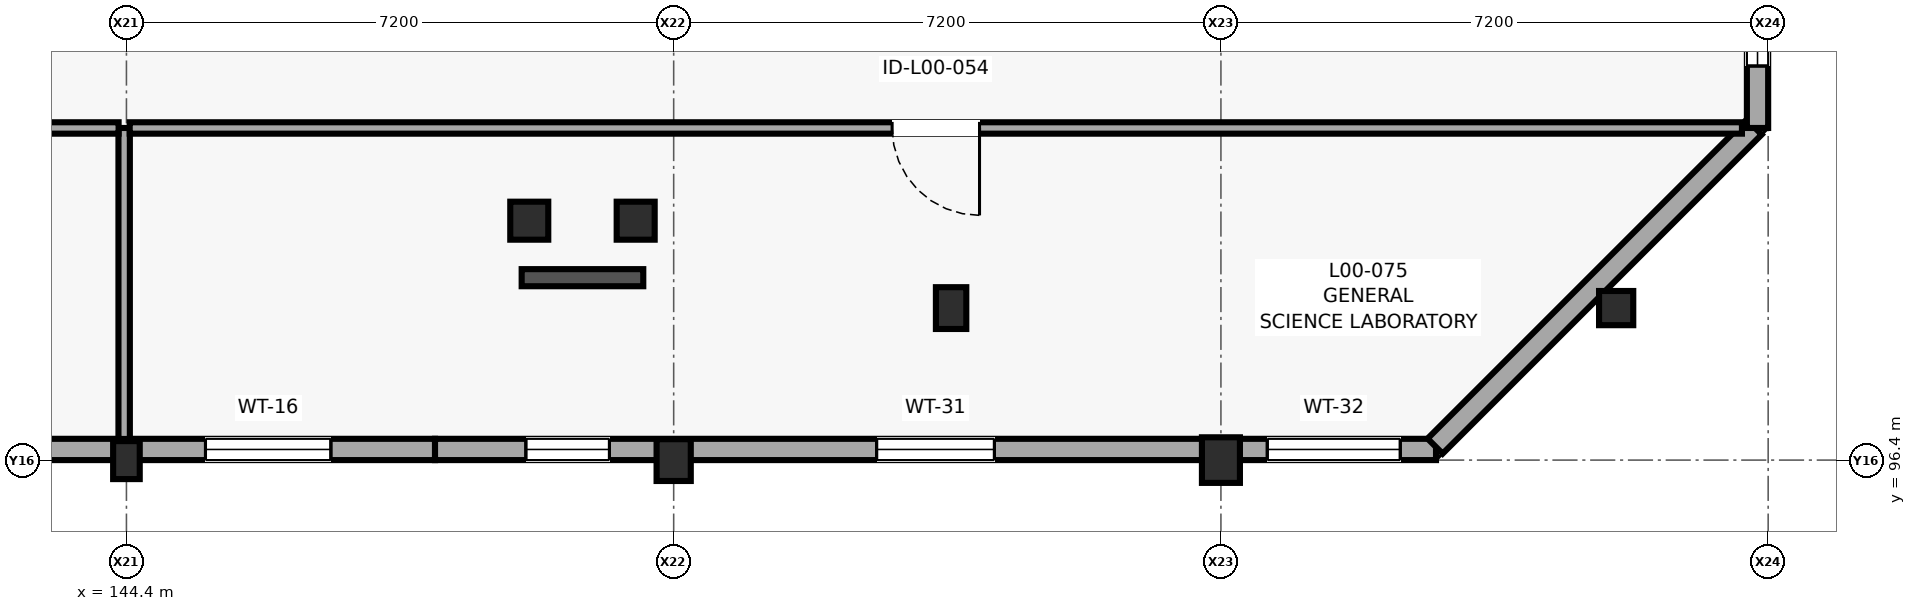
"""IFC4 building model, lengths in metres.
Left out: names, types, materials, properties, quantities, classifications, styles, units other than length and angle.
Written with IfcOpenShell. Run it as: python <this file> out.ifc"""

import sys

from ifc_helpers import new_model, si_unit, direction, frame, frame_2d, origin, origin_2d, place, context, subcontext, project, spatial, rectangle, extrude, element, fill, save


model = new_model("IFC4")
c1 = context("Model", 3, precision=1e-05, world=origin(), true_north=direction((0.0, 1.0)))
c2 = subcontext(c1, "Body", "Model", "MODEL_VIEW")
j1 = project(units=[si_unit("LENGTHUNIT", "METRE"), si_unit("PLANEANGLEUNIT", "RADIAN")], contexts=[c1])
p1 = place(None, origin())
s1 = spatial("IfcSite", under=j1, at=p1, CompositionType="ELEMENT")
p2 = place(p1, origin())
s2 = spatial("IfcBuilding", under=s1, at=p2, CompositionType="ELEMENT")
p3 = place(p2, origin())
s3 = spatial("IfcBuildingStorey", under=s2, at=p3, CompositionType="ELEMENT", Elevation=0.0)
p4 = place(p3, frame((144.4, 96.4, 0.0), z_axis=(0.0, 0.0, 1.0), x_axis=(1.0, 0.0, 0.0)))
e1 = element("IfcColumn", 1, at=p4, inside=s3, PredefinedType="PILASTER", context=c2, shape_type="SweptSolid", body=[
    extrude(rectangle(XDim=0.35, YDim=0.5, at=origin_2d()), origin(), (0.0, 0.0, 1.0), 4.2),
])
for number, where, z_axis, x_axis in (
    (2, (149.7, 99.55, 0.0), (0.0, 0.0, 1.0), (1.0, 0.0, 0.0)),
    (3, (151.1, 99.55, 0.0), (0.0, 0.0, 1.0), (1.0, 0.0, 0.0)),
):
    element("IfcColumn", number, at=place(p3, frame(where, z_axis=z_axis, x_axis=x_axis)), inside=s3, PredefinedType="COLUMN", context=c2, shape_type="SweptSolid", body=[
        extrude(rectangle(XDim=0.5, YDim=0.5, at=origin_2d()), origin(), (0.0, 0.0, 1.0), 4.2),
    ])
p5 = place(p3, frame((151.6, 96.4, 0.0), z_axis=(0.0, 0.0, 1.0), x_axis=(1.0, 0.0, 0.0)))
e4 = element("IfcColumn", 4, at=p5, inside=s3, PredefinedType="PILASTER", context=c2, shape_type="SweptSolid", body=[
    extrude(rectangle(XDim=0.45, YDim=0.55, at=origin_2d()), origin(), (0.0, 0.0, 1.0), 4.2),
])
p6 = place(p3, frame((155.25, 98.4, 0.0), z_axis=(0.0, 0.0, 1.0), x_axis=(1.0, 0.0, 0.0)))
e5 = element("IfcColumn", 5, at=p6, inside=s3, PredefinedType="COLUMN", context=c2, shape_type="SweptSolid", body=[
    extrude(rectangle(XDim=0.4, YDim=0.55, at=origin_2d()), origin(), (0.0, 0.0, 1.0), 4.2),
])
p7 = place(p3, frame((158.8, 96.4, 0.0), z_axis=(0.0, 0.0, 1.0), x_axis=(1.0, 0.0, 0.0)))
e6 = element("IfcColumn", 6, at=p7, inside=s3, PredefinedType="PILASTER", context=c2, shape_type="SweptSolid", body=[
    extrude(rectangle(XDim=0.5, YDim=0.6, at=origin_2d()), origin(), (0.0, 0.0, 1.0), 4.2),
])
p8 = place(p3, frame((164.0, 98.4, 0.0), z_axis=(0.0, 0.0, 1.0), x_axis=(1.0, 0.0, 0.0)))
e7 = element("IfcColumn", 7, at=p8, inside=s3, PredefinedType="COLUMN", context=c2, shape_type="SweptSolid", body=[
    extrude(rectangle(XDim=0.45, YDim=0.45, at=origin_2d()), origin(), (0.0, 0.0, 1.0), 4.2),
])
p9 = place(p3, frame((135.29, 96.54, 0.0), z_axis=(0.0, 0.0, 1.0), x_axis=(1.0, 0.0, 0.0)))
e8 = element("IfcWall", 8, at=p9, inside=s3, PredefinedType="SOLIDWALL", context=c2, shape_type="SweptSolid", body=[
    extrude(rectangle(XDim=13.17, YDim=0.28, at=frame_2d((6.585, 0.0))), origin(), (0.0, 0.0, 1.0), 3.215),
])
p10 = place(p9, frame((2.345, 0.0, 0.675)))
e9 = element("IfcOpeningElement", 9, at=p10, cuts=e8, PredefinedType="OPENING", context=c2, shape_type="SweptSolid", body=[
    extrude(rectangle(XDim=1.4, YDim=2.4, at=frame_2d((0.7, 1.2))), frame((0.0, 0.15, 0.0), z_axis=(0.0, -1.0, 0.0), x_axis=(1.0, 0.0, 0.0)), (0.0, 0.0, 1.0), 0.3),
])
p11 = place(p9, frame((5.585, 0.0, 0.75)))
e10 = element("IfcOpeningElement", 10, at=p11, cuts=e8, PredefinedType="OPENING", context=c2, shape_type="SweptSolid", body=[
    extrude(rectangle(XDim=2.0, YDim=2.1, at=frame_2d((1.0, 1.05))), frame((0.0, 0.15, 0.0), z_axis=(0.0, -1.0, 0.0), x_axis=(1.0, 0.0, 0.0)), (0.0, 0.0, 1.0), 0.3),
])
p12 = place(p9, frame((10.15, 0.0, 0.85)))
e11 = element("IfcOpeningElement", 11, at=p12, cuts=e8, PredefinedType="OPENING", context=c2, shape_type="SweptSolid", body=[
    extrude(rectangle(XDim=1.65, YDim=1.95, at=frame_2d((0.825, 0.975))), frame((0.0, 0.15, 0.0), z_axis=(0.0, -1.0, 0.0), x_axis=(1.0, 0.0, 0.0)), (0.0, 0.0, 1.0), 0.3),
])
p13 = place(p3, frame((148.46, 96.54, 0.0), z_axis=(0.0, 0.0, 1.0), x_axis=(1.0, 0.0, 0.0)))
e12 = element("IfcWall", 12, at=p13, inside=s3, PredefinedType="SOLIDWALL", context=c2, shape_type="SweptSolid", body=[
    extrude(rectangle(XDim=13.17, YDim=0.28, at=frame_2d((6.585, 0.0))), origin(), (0.0, 0.0, 1.0), 3.315),
])
p14 = place(p13, frame((1.195, 0.0, 0.75)))
e13 = element("IfcOpeningElement", 13, at=p14, cuts=e12, PredefinedType="OPENING", context=c2, shape_type="SweptSolid", body=[
    extrude(rectangle(XDim=1.1, YDim=2.1, at=frame_2d((0.55, 1.05))), frame((0.0, 0.15, 0.0), z_axis=(0.0, -1.0, 0.0), x_axis=(1.0, 0.0, 0.0)), (0.0, 0.0, 1.0), 0.3),
])
p15 = place(p13, frame((5.81, 0.0, 0.85)))
e14 = element("IfcOpeningElement", 14, at=p15, cuts=e12, PredefinedType="OPENING", context=c2, shape_type="SweptSolid", body=[
    extrude(rectangle(XDim=1.55, YDim=1.85, at=frame_2d((0.775, 0.925))), frame((0.0, 0.15, 0.0), z_axis=(0.0, -1.0, 0.0), x_axis=(1.0, 0.0, 0.0)), (0.0, 0.0, 1.0), 0.3),
])
p16 = place(p13, frame((10.95, 0.0, 0.75)))
e15 = element("IfcOpeningElement", 15, at=p16, cuts=e12, PredefinedType="OPENING", context=c2, shape_type="SweptSolid", body=[
    extrude(rectangle(XDim=1.75, YDim=2.05, at=frame_2d((0.875, 1.025))), frame((0.0, 0.15, 0.0), z_axis=(0.0, -1.0, 0.0), x_axis=(1.0, 0.0, 0.0)), (0.0, 0.0, 1.0), 0.3),
])
p17 = place(p3, frame((161.618, 96.584, 0.0), z_axis=(0.0, 0.0, 1.0), x_axis=(0.707106781187, 0.707106781187, 0.0)))
e16 = element("IfcWall", 16, at=p17, inside=s3, PredefinedType="SOLIDWALL", context=c2, shape_type="SweptSolid", body=[
    extrude(rectangle(XDim=5.937, YDim=0.28, at=frame_2d((2.968, 0.0))), origin(), (0.0, 0.0, 1.0), 3.98),
])
p18 = place(p3, frame((165.86, 100.77, 0.0), z_axis=(0.0, 0.0, 1.0), x_axis=(0.0, 1.0, 0.0)))
e17 = element("IfcWall", 17, at=p18, inside=s3, PredefinedType="SOLIDWALL", context=c2, shape_type="SweptSolid", body=[
    extrude(rectangle(XDim=6.86, YDim=0.28, at=frame_2d((3.43, 0.0))), origin(), (0.0, 0.0, 1.0), 3.98),
])
p19 = place(p18, frame((0.815, 0.0, 0.85)))
e18 = element("IfcOpeningElement", 18, at=p19, cuts=e17, PredefinedType="OPENING", context=c2, shape_type="SweptSolid", body=[
    extrude(rectangle(XDim=1.8, YDim=1.8, at=frame_2d((0.9, 0.9))), frame((0.0, 0.15, 0.0), z_axis=(0.0, -1.0, 0.0), x_axis=(1.0, 0.0, 0.0)), (0.0, 0.0, 1.0), 0.3),
])
p20 = place(p18, frame((4.095, 0.0, 0.85)))
e19 = element("IfcOpeningElement", 19, at=p20, cuts=e17, PredefinedType="OPENING", context=c2, shape_type="SweptSolid", body=[
    extrude(rectangle(XDim=2.1, YDim=1.8, at=frame_2d((1.05, 0.9))), frame((0.0, 0.15, 0.0), z_axis=(0.0, -1.0, 0.0), x_axis=(1.0, 0.0, 0.0)), (0.0, 0.0, 1.0), 0.3),
])
p21 = place(p3, frame((149.6, 98.8, 0.0), z_axis=(0.0, 0.0, 1.0), x_axis=(1.0, 0.0, 0.0)))
e20 = element("IfcWall", 20, at=p21, inside=s3, PredefinedType="SHEAR", context=c2, shape_type="SweptSolid", body=[
    extrude(rectangle(XDim=1.6, YDim=0.225, at=frame_2d((0.8, 0.0))), origin(), (0.0, 0.0, 1.0), 3.92),
])
p22 = place(p3, frame((144.37, 96.678, 0.0), z_axis=(0.0, 0.0, 1.0), x_axis=(0.0, 1.0, 0.0)))
e21 = element("IfcWall", 21, at=p22, inside=s3, PredefinedType="PARTITIONING", context=c2, shape_type="SweptSolid", body=[
    extrude(rectangle(XDim=4.092, YDim=0.15, at=frame_2d((2.046, 0.0))), origin(), (0.0, 0.0, 1.0), 3.365),
])
p23 = place(p3, frame((144.297, 100.77, 0.0), z_axis=(0.0, 0.0, 1.0), x_axis=(-1.0, 0.0, 0.0)))
e22 = element("IfcWall", 22, at=p23, inside=s3, PredefinedType="PARTITIONING", context=c2, shape_type="SweptSolid", body=[
    extrude(rectangle(XDim=21.454, YDim=0.15, at=frame_2d((10.727, 0.0))), origin(), (0.0, 0.0, 1.0), 3.915),
])
p24 = place(p23, frame((10.152, 0.0, 0.0)))
e23 = element("IfcOpeningElement", 23, at=p24, cuts=e22, PredefinedType="OPENING", context=c2, shape_type="SweptSolid", body=[
    extrude(rectangle(XDim=1.15, YDim=2.2, at=frame_2d((0.575, 1.1))), frame((0.0, 0.085, 0.0), z_axis=(0.0, -1.0, 0.0), x_axis=(1.0, 0.0, 0.0)), (0.0, 0.0, 1.0), 0.17),
])
p25 = place(p3, frame((165.655, 100.77, 0.0), z_axis=(0.0, 0.0, 1.0), x_axis=(-1.0, 0.0, 0.0)))
e24 = element("IfcWall", 24, at=p25, inside=s3, PredefinedType="PARTITIONING", context=c2, shape_type="SweptSolid", body=[
    extrude(rectangle(XDim=21.212, YDim=0.15, at=frame_2d((10.606, 0.0))), origin(), (0.0, 0.0, 1.0), 3.915),
])
p26 = place(p25, frame((10.031, 0.0, 0.0)))
e25 = element("IfcOpeningElement", 25, at=p26, cuts=e24, PredefinedType="OPENING", context=c2, shape_type="SweptSolid", body=[
    extrude(rectangle(XDim=1.15, YDim=2.2, at=frame_2d((0.575, 1.1))), frame((0.0, 0.085, 0.0), z_axis=(0.0, -1.0, 0.0), x_axis=(1.0, 0.0, 0.0)), (0.0, 0.0, 1.0), 0.17),
])
p27 = place(p12, origin())
e26 = element("IfcWindow", 26, at=p27, inside=s3, PartitioningType="SINGLE_PANEL", PredefinedType="WINDOW", context=c2, shape_type="SweptSolid", body=[
    extrude(rectangle(XDim=1.65, YDim=1.95, at=frame_2d((0.825, 0.975))), frame((0.0, 0.03, 0.0), z_axis=(0.0, -1.0, 0.0), x_axis=(1.0, 0.0, 0.0)), (0.0, 0.0, 1.0), 0.06),
])
fill(e11, e26)
p28 = place(p14, origin())
e27 = element("IfcWindow", 27, at=p28, inside=s3, PartitioningType="SINGLE_PANEL", PredefinedType="WINDOW", context=c2, shape_type="SweptSolid", body=[
    extrude(rectangle(XDim=1.1, YDim=2.1, at=frame_2d((0.55, 1.05))), frame((0.0, 0.03, 0.0), z_axis=(0.0, -1.0, 0.0), x_axis=(1.0, 0.0, 0.0)), (0.0, 0.0, 1.0), 0.06),
])
fill(e13, e27)
p29 = place(p15, origin())
e28 = element("IfcWindow", 28, at=p29, inside=s3, PartitioningType="SINGLE_PANEL", PredefinedType="WINDOW", context=c2, shape_type="SweptSolid", body=[
    extrude(rectangle(XDim=1.55, YDim=1.85, at=frame_2d((0.775, 0.925))), frame((0.0, 0.03, 0.0), z_axis=(0.0, -1.0, 0.0), x_axis=(1.0, 0.0, 0.0)), (0.0, 0.0, 1.0), 0.06),
])
fill(e14, e28)
p30 = place(p16, origin())
e29 = element("IfcWindow", 29, at=p30, inside=s3, PartitioningType="SINGLE_PANEL", PredefinedType="WINDOW", context=c2, shape_type="SweptSolid", body=[
    extrude(rectangle(XDim=1.75, YDim=2.05, at=frame_2d((0.875, 1.025))), frame((0.0, 0.03, 0.0), z_axis=(0.0, -1.0, 0.0), x_axis=(1.0, 0.0, 0.0)), (0.0, 0.0, 1.0), 0.06),
])
fill(e15, e29)
p31 = place(p19, origin())
e30 = element("IfcWindow", 30, at=p31, inside=s3, PartitioningType="SINGLE_PANEL", PredefinedType="WINDOW", context=c2, shape_type="SweptSolid", body=[
    extrude(rectangle(XDim=1.8, YDim=1.8, at=frame_2d((0.9, 0.9))), frame((0.0, 0.03, 0.0), z_axis=(0.0, -1.0, 0.0), x_axis=(1.0, 0.0, 0.0)), (0.0, 0.0, 1.0), 0.06),
])
fill(e18, e30)
p32 = place(p26, origin())
e31 = element("IfcDoor", 31, at=p32, inside=s3, OperationType="SINGLE_SWING_LEFT", PredefinedType="DOOR", context=c2, shape_type="SweptSolid", body=[
    extrude(rectangle(XDim=1.15, YDim=2.2, at=frame_2d((0.575, 1.1))), frame((0.0, 0.025, 0.0), z_axis=(0.0, -1.0, 0.0), x_axis=(1.0, 0.0, 0.0)), (0.0, 0.0, 1.0), 0.05),
])
fill(e25, e31)
save(model, sys.argv[1])
